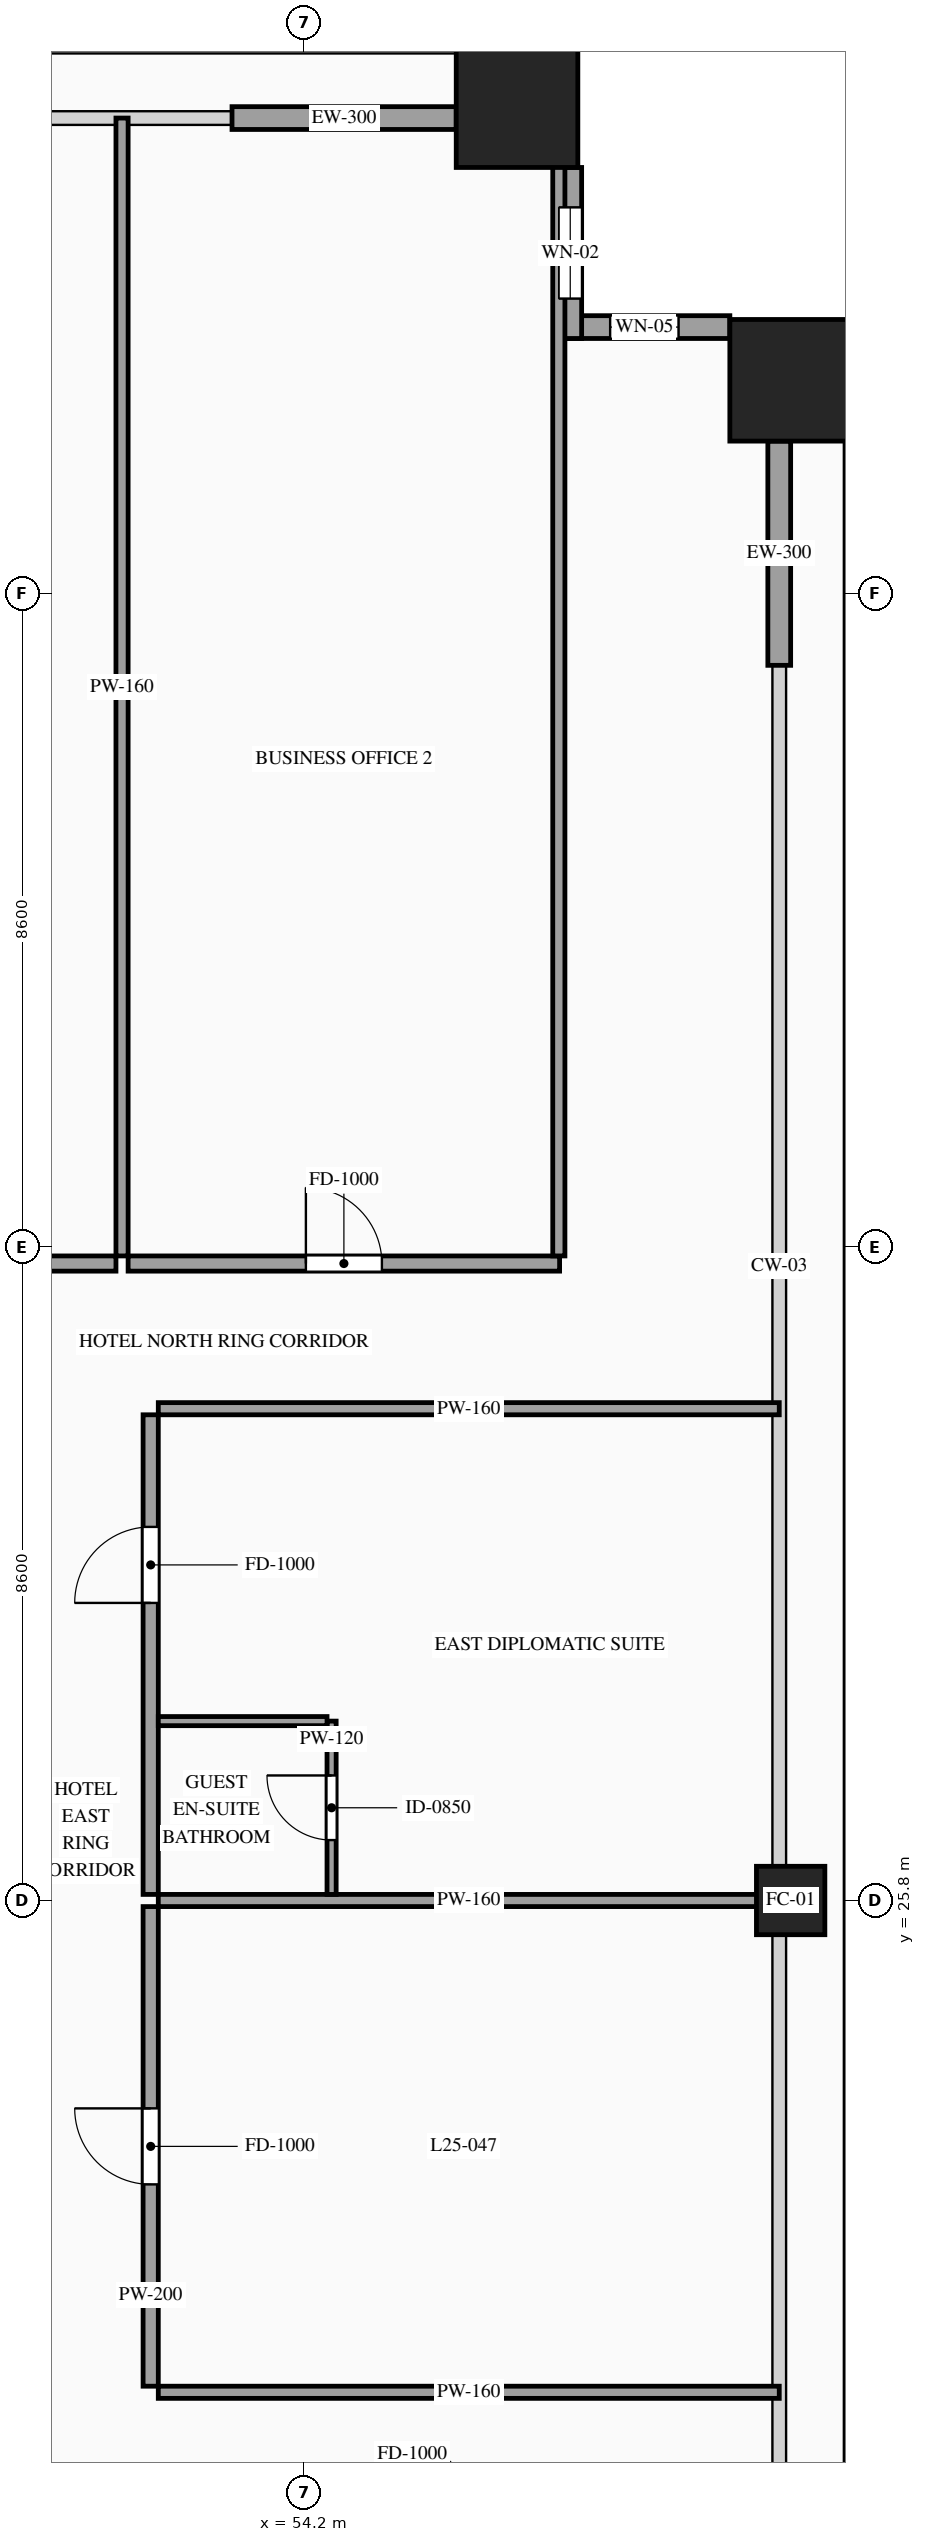
"""IFC4 building model, lengths in metres.
Left out: names, types, materials, properties, quantities, classifications, styles, units other than length and angle.
Written with IfcOpenShell. Run it as: python <this file> out.ifc"""

import sys

from ifc_helpers import new_model, si_unit, direction, frame, frame_2d, origin, origin_2d, place, context, subcontext, project, spatial, rectangle, hollow_rectangle, extrude, source, transform, mapped, element, fill, save


model = new_model("IFC4")
c1 = context("Model", 3, precision=1e-05, world=origin(), true_north=direction((0.0, 1.0)))
c2 = subcontext(c1, "Body", "Model", "MODEL_VIEW")
j1 = project(units=[si_unit("LENGTHUNIT", "METRE"), si_unit("PLANEANGLEUNIT", "RADIAN")], contexts=[c1])
p1 = place(None, origin())
s1 = spatial("IfcSite", under=j1, at=p1, CompositionType="ELEMENT")
p2 = place(p1, origin())
s2 = spatial("IfcBuilding", under=s1, at=p2, CompositionType="ELEMENT")
p3 = place(p2, frame((0.0, 0.0, 97.4)))
s3 = spatial("IfcBuildingStorey", under=s2, at=p3, CompositionType="ELEMENT", Elevation=97.4)
m1 = source(origin(), c2, "Body", "SweptSolid", [
    extrude(hollow_rectangle(XDim=1.6, YDim=1.6, WallThickness=0.07, at=origin_2d()), origin(), (0.0, 0.0, 1.0), 3.6),
])
p4 = place(p3, frame((57.0, 49.4, 0.0), z_axis=(0.0, 0.0, 1.0), x_axis=(1.0, 0.0, 0.0)))
e1 = element("IfcColumn", 1, at=p4, inside=s3, PredefinedType="COLUMN", context=c2, shape_type="MappedRepresentation", body=[
    mapped(m1, transform((0.0, 0.0, 0.0), scale=1.0)),
])
m2 = source(origin(), c2, "Body", "SweptSolid", [
    extrude(hollow_rectangle(XDim=0.9, YDim=0.9, WallThickness=0.042, at=origin_2d()), origin(), (0.0, 0.0, 1.0), 3.6),
])
p5 = place(p3, frame((60.6, 25.8, 0.0), z_axis=(0.0, 0.0, 1.0), x_axis=(1.0, 0.0, 0.0)))
e2 = element("IfcColumn", 2, at=p5, inside=s3, PredefinedType="COLUMN", context=c2, shape_type="MappedRepresentation", body=[
    mapped(m2, transform((0.0, 0.0, 0.0), scale=1.0)),
])
p6 = place(p3, frame((60.6, 45.8, 0.0), z_axis=(0.0, 0.0, 1.0), x_axis=(1.0, 0.0, 0.0)))
e3 = element("IfcColumn", 3, at=p6, inside=s3, PredefinedType="COLUMN", context=c2, shape_type="MappedRepresentation", body=[
    mapped(m1, transform((0.0, 0.0, 0.0), scale=1.0)),
])
p7 = place(p3, frame((59.8, 46.5, 0.0), z_axis=(0.0, 0.0, 1.0), x_axis=(-1.0, 0.0, 0.0)))
e4 = element("IfcWall", 4, at=p7, inside=s3, PredefinedType="SOLIDWALL", context=c2, shape_type="SweptSolid", body=[
    extrude(rectangle(XDim=2.25, YDim=0.3, at=frame_2d((1.125, 0.0))), origin(), (0.0, 0.0, 1.0), 3.38),
])
p8 = place(p7, frame((0.675, 0.0, 0.85)))
e5 = element("IfcOpeningElement", 5, at=p8, cuts=e4, PredefinedType="OPENING", context=c2, shape_type="SweptSolid", body=[
    extrude(rectangle(XDim=0.9, YDim=1.5, at=frame_2d((0.45, 0.75))), frame((0.0, 0.165, 0.0), z_axis=(0.0, -1.0, 0.0), x_axis=(1.0, 0.0, 0.0)), (0.0, 0.0, 1.0), 0.33),
])
p9 = place(p3, frame((57.7, 46.35, 0.0), z_axis=(0.0, 0.0, 1.0), x_axis=(0.0, 1.0, 0.0)))
e6 = element("IfcWall", 6, at=p9, inside=s3, PredefinedType="SOLIDWALL", context=c2, shape_type="SweptSolid", body=[
    extrude(rectangle(XDim=2.25, YDim=0.3, at=frame_2d((1.125, 0.0))), origin(), (0.0, 0.0, 1.0), 3.38),
])
p10 = place(p9, frame((0.525, 0.0, 0.85)))
e7 = element("IfcOpeningElement", 7, at=p10, cuts=e6, PredefinedType="OPENING", context=c2, shape_type="SweptSolid", body=[
    extrude(rectangle(XDim=1.2, YDim=2.1, at=frame_2d((0.6, 1.05))), frame((0.0, 0.165, 0.0), z_axis=(0.0, -1.0, 0.0), x_axis=(1.0, 0.0, 0.0)), (0.0, 0.0, 1.0), 0.33),
])
m3 = source(origin(), c2, "Body", "SweptSolid", [
    extrude(rectangle(XDim=2.95, YDim=0.3, at=frame_2d((1.475, 0.0))), origin(), (0.0, 0.0, 1.0), 2.775),
])
for number, where, z_axis, x_axis in (
    (8, (53.25, 49.25, 0.0), (0.0, 0.0, 1.0), (1.0, 0.0, 0.0)),
    (9, (60.45, 42.05, 0.0), (0.0, 0.0, 1.0), (0.0, 1.0, 0.0)),
):
    element("IfcWall", number, at=place(p3, frame(where, z_axis=z_axis, x_axis=x_axis)), inside=s3, PredefinedType="SOLIDWALL", context=c2, shape_type="MappedRepresentation", body=[
        mapped(m3, transform((0.0, 0.0, 0.0), scale=1.0)),
    ])
p11 = place(p3, frame((45.069, 34.18, 0.0), z_axis=(0.0, 0.0, 1.0), x_axis=(1.0, 0.0, 0.0)))
e10 = element("IfcWall", 10, at=p11, inside=s3, PredefinedType="PARTITIONING", context=c2, shape_type="SweptSolid", body=[
    extrude(rectangle(XDim=6.654, YDim=0.2, at=frame_2d((3.327, 0.0))), origin(), (0.0, 0.0, 1.0), 3.38),
])
p12 = place(p11, frame((2.827, 0.0, 0.0)))
e11 = element("IfcOpeningElement", 11, at=p12, cuts=e10, PredefinedType="OPENING", context=c2, shape_type="SweptSolid", body=[
    extrude(rectangle(XDim=1.0, YDim=2.2, at=frame_2d((0.5, 1.1))), frame((0.0, 0.115, 0.0), z_axis=(0.0, -1.0, 0.0), x_axis=(1.0, 0.0, 0.0)), (0.0, 0.0, 1.0), 0.23),
])
m4 = source(origin(), c2, "Body", "SweptSolid", [
    extrude(rectangle(XDim=14.97, YDim=0.16, at=frame_2d((7.485, 0.0))), origin(), (0.0, 0.0, 1.0), 3.38),
])
p13 = place(p3, frame((51.803, 34.28, 0.0), z_axis=(0.0, 0.0, 1.0), x_axis=(0.0, 1.0, 0.0)))
e12 = element("IfcWall", 12, at=p13, inside=s3, PredefinedType="PARTITIONING", context=c2, shape_type="MappedRepresentation", body=[
    mapped(m4, transform((0.0, 0.0, 0.0), scale=1.0)),
])
p14 = place(p3, frame((51.883, 34.18, 0.0), z_axis=(0.0, 0.0, 1.0), x_axis=(1.0, 0.0, 0.0)))
e13 = element("IfcWall", 13, at=p14, inside=s3, PredefinedType="PARTITIONING", context=c2, shape_type="SweptSolid", body=[
    extrude(rectangle(XDim=5.677, YDim=0.2, at=frame_2d((2.838, 0.0))), origin(), (0.0, 0.0, 1.0), 3.38),
])
p15 = place(p14, frame((2.339, 0.0, 0.0)))
e14 = element("IfcOpeningElement", 14, at=p15, cuts=e13, PredefinedType="OPENING", context=c2, shape_type="SweptSolid", body=[
    extrude(rectangle(XDim=1.0, YDim=2.2, at=frame_2d((0.5, 1.1))), frame((0.0, 0.115, 0.0), z_axis=(0.0, -1.0, 0.0), x_axis=(1.0, 0.0, 0.0)), (0.0, 0.0, 1.0), 0.23),
])
m5 = source(origin(), c2, "Body", "SweptSolid", [
    extrude(rectangle(XDim=14.82, YDim=0.16, at=frame_2d((7.41, 0.0))), origin(), (0.0, 0.0, 1.0), 3.38),
])
p16 = place(p3, frame((57.55, 34.28, 0.0), z_axis=(0.0, 0.0, 1.0), x_axis=(0.0, 1.0, 0.0)))
e15 = element("IfcWall", 15, at=p16, inside=s3, PredefinedType="PARTITIONING", context=c2, shape_type="MappedRepresentation", body=[
    mapped(m5, transform((0.0, 0.0, 0.0), scale=1.0)),
])
p17 = place(p3, frame((52.18, 19.41, 0.0), z_axis=(0.0, 0.0, 1.0), x_axis=(0.0, 1.0, 0.0)))
e16 = element("IfcWall", 16, at=p17, inside=s3, PredefinedType="PARTITIONING", context=c2, shape_type="SweptSolid", body=[
    extrude(rectangle(XDim=6.31, YDim=0.2, at=frame_2d((3.155, 0.0))), origin(), (0.0, 0.0, 1.0), 3.38),
])
p18 = place(p17, frame((2.655, 0.0, 0.0)))
e17 = element("IfcOpeningElement", 17, at=p18, cuts=e16, PredefinedType="OPENING", context=c2, shape_type="SweptSolid", body=[
    extrude(rectangle(XDim=1.0, YDim=2.2, at=frame_2d((0.5, 1.1))), frame((0.0, 0.115, 0.0), z_axis=(0.0, -1.0, 0.0), x_axis=(1.0, 0.0, 0.0)), (0.0, 0.0, 1.0), 0.23),
])
m6 = source(origin(), c2, "Body", "SweptSolid", [
    extrude(rectangle(XDim=8.17, YDim=0.16, at=frame_2d((4.085, 0.0))), origin(), (0.0, 0.0, 1.0), 2.675),
])
p19 = place(p3, frame((52.28, 25.8, 0.0), z_axis=(0.0, 0.0, 1.0), x_axis=(1.0, 0.0, 0.0)))
e18 = element("IfcWall", 18, at=p19, inside=s3, PredefinedType="PARTITIONING", context=c2, shape_type="MappedRepresentation", body=[
    mapped(m6, transform((0.0, 0.0, 0.0), scale=1.0)),
])
m7 = source(origin(), c2, "Body", "SweptSolid", [
    extrude(rectangle(XDim=8.17, YDim=0.16, at=frame_2d((4.085, 0.0))), origin(), (0.0, 0.0, 1.0), 2.875),
])
p20 = place(p3, frame((52.28, 19.33, 0.0), z_axis=(0.0, 0.0, 1.0), x_axis=(1.0, 0.0, 0.0)))
e19 = element("IfcWall", 19, at=p20, inside=s3, PredefinedType="PARTITIONING", context=c2, shape_type="MappedRepresentation", body=[
    mapped(m7, transform((0.0, 0.0, 0.0), scale=1.0)),
])
p21 = place(p3, frame((52.18, 25.88, 0.0), z_axis=(0.0, 0.0, 1.0), x_axis=(0.0, 1.0, 0.0)))
e20 = element("IfcWall", 20, at=p21, inside=s3, PredefinedType="PARTITIONING", context=c2, shape_type="SweptSolid", body=[
    extrude(rectangle(XDim=6.31, YDim=0.2, at=frame_2d((3.155, 0.0))), origin(), (0.0, 0.0, 1.0), 3.38),
])
p22 = place(p21, frame((3.835, 0.0, 0.0)))
e21 = element("IfcOpeningElement", 21, at=p22, cuts=e20, PredefinedType="OPENING", context=c2, shape_type="SweptSolid", body=[
    extrude(rectangle(XDim=1.0, YDim=2.2, at=frame_2d((0.5, 1.1))), frame((0.0, 0.115, 0.0), z_axis=(0.0, -1.0, 0.0), x_axis=(1.0, 0.0, 0.0)), (0.0, 0.0, 1.0), 0.23),
])
p23 = place(p3, frame((52.28, 32.27, 0.0), z_axis=(0.0, 0.0, 1.0), x_axis=(1.0, 0.0, 0.0)))
e22 = element("IfcWall", 22, at=p23, inside=s3, PredefinedType="PARTITIONING", context=c2, shape_type="MappedRepresentation", body=[
    mapped(m7, transform((0.0, 0.0, 0.0), scale=1.0)),
])
p24 = place(p3, frame((54.56, 25.88, 0.0), z_axis=(0.0, 0.0, 1.0), x_axis=(0.0, 1.0, 0.0)))
e23 = element("IfcWall", 23, at=p24, inside=s3, PredefinedType="PARTITIONING", context=c2, shape_type="SweptSolid", body=[
    extrude(rectangle(XDim=2.28, YDim=0.12, at=frame_2d((1.14, 0.0))), origin(), (0.0, 0.0, 1.0), 3.38),
])
p25 = place(p24, frame((0.715, 0.0, 0.0)))
e24 = element("IfcOpeningElement", 24, at=p25, cuts=e23, PredefinedType="OPENING", context=c2, shape_type="SweptSolid", body=[
    extrude(rectangle(XDim=0.85, YDim=2.1, at=frame_2d((0.425, 1.05))), frame((0.0, 0.075, 0.0), z_axis=(0.0, -1.0, 0.0), x_axis=(1.0, 0.0, 0.0)), (0.0, 0.0, 1.0), 0.15),
])
m8 = source(origin(), c2, "Body", "SweptSolid", [
    extrude(rectangle(XDim=2.22, YDim=0.12, at=frame_2d((1.11, 0.0))), origin(), (0.0, 0.0, 1.0), 3.38),
])
p26 = place(p3, frame((52.28, 28.16, 0.0), z_axis=(0.0, 0.0, 1.0), x_axis=(1.0, 0.0, 0.0)))
e25 = element("IfcWall", 25, at=p26, inside=s3, PredefinedType="PARTITIONING", context=c2, shape_type="MappedRepresentation", body=[
    mapped(m8, transform((0.0, 0.0, 0.0), scale=1.0)),
])
m9 = source(origin(), c2, "Body", "SweptSolid", [
    extrude(rectangle(XDim=0.9, YDim=1.5, at=frame_2d((0.45, 0.75))), frame((0.0, 0.03, 0.0), z_axis=(0.0, -1.0, 0.0), x_axis=(1.0, 0.0, 0.0)), (0.0, 0.0, 1.0), 0.06),
])
p27 = place(p8, origin())
e26 = element("IfcWindow", 26, at=p27, inside=s3, PartitioningType="SINGLE_PANEL", PredefinedType="WINDOW", context=c2, shape_type="MappedRepresentation", body=[
    mapped(m9, transform((0.0, 0.0, 0.0), scale=1.0)),
])
fill(e5, e26)
m10 = source(origin(), c2, "Body", "SweptSolid", [
    extrude(rectangle(XDim=1.2, YDim=2.1, at=frame_2d((0.6, 1.05))), frame((0.0, 0.03, 0.0), z_axis=(0.0, -1.0, 0.0), x_axis=(1.0, 0.0, 0.0)), (0.0, 0.0, 1.0), 0.06),
])
p28 = place(p10, origin())
e27 = element("IfcWindow", 27, at=p28, inside=s3, PartitioningType="SINGLE_PANEL", PredefinedType="WINDOW", context=c2, shape_type="MappedRepresentation", body=[
    mapped(m10, transform((0.0, 0.0, 0.0), scale=1.0)),
])
fill(e7, e27)
m11 = source(origin(), c2, "Body", "SweptSolid", [
    extrude(rectangle(XDim=1.0, YDim=2.2, at=frame_2d((0.5, 1.1))), frame((0.0, 0.025, 0.0), z_axis=(0.0, -1.0, 0.0), x_axis=(1.0, 0.0, 0.0)), (0.0, 0.0, 1.0), 0.05),
])
p29 = place(p15, origin())
e28 = element("IfcDoor", 28, at=p29, inside=s3, OperationType="SINGLE_SWING_LEFT", PredefinedType="DOOR", context=c2, shape_type="MappedRepresentation", body=[
    mapped(m11, transform((0.0, 0.0, 0.0), scale=1.0)),
])
fill(e14, e28)
p30 = place(p18, origin())
e29 = element("IfcDoor", 29, at=p30, inside=s3, OperationType="SINGLE_SWING_RIGHT", PredefinedType="DOOR", context=c2, shape_type="MappedRepresentation", body=[
    mapped(m11, transform((0.0, 0.0, 0.0), scale=1.0)),
])
fill(e17, e29)
p31 = place(p22, origin())
e30 = element("IfcDoor", 30, at=p31, inside=s3, OperationType="SINGLE_SWING_LEFT", PredefinedType="DOOR", context=c2, shape_type="MappedRepresentation", body=[
    mapped(m11, transform((0.0, 0.0, 0.0), scale=1.0)),
])
fill(e21, e30)
m12 = source(origin(), c2, "Body", "SweptSolid", [
    extrude(rectangle(XDim=0.85, YDim=2.1, at=frame_2d((0.425, 1.05))), frame((0.0, 0.025, 0.0), z_axis=(0.0, -1.0, 0.0), x_axis=(1.0, 0.0, 0.0)), (0.0, 0.0, 1.0), 0.05),
])
p32 = place(p25, origin())
e31 = element("IfcDoor", 31, at=p32, inside=s3, OperationType="SINGLE_SWING_RIGHT", PredefinedType="DOOR", context=c2, shape_type="MappedRepresentation", body=[
    mapped(m12, transform((0.0, 0.0, 0.0), scale=1.0)),
])
fill(e24, e31)
save(model, sys.argv[1])
